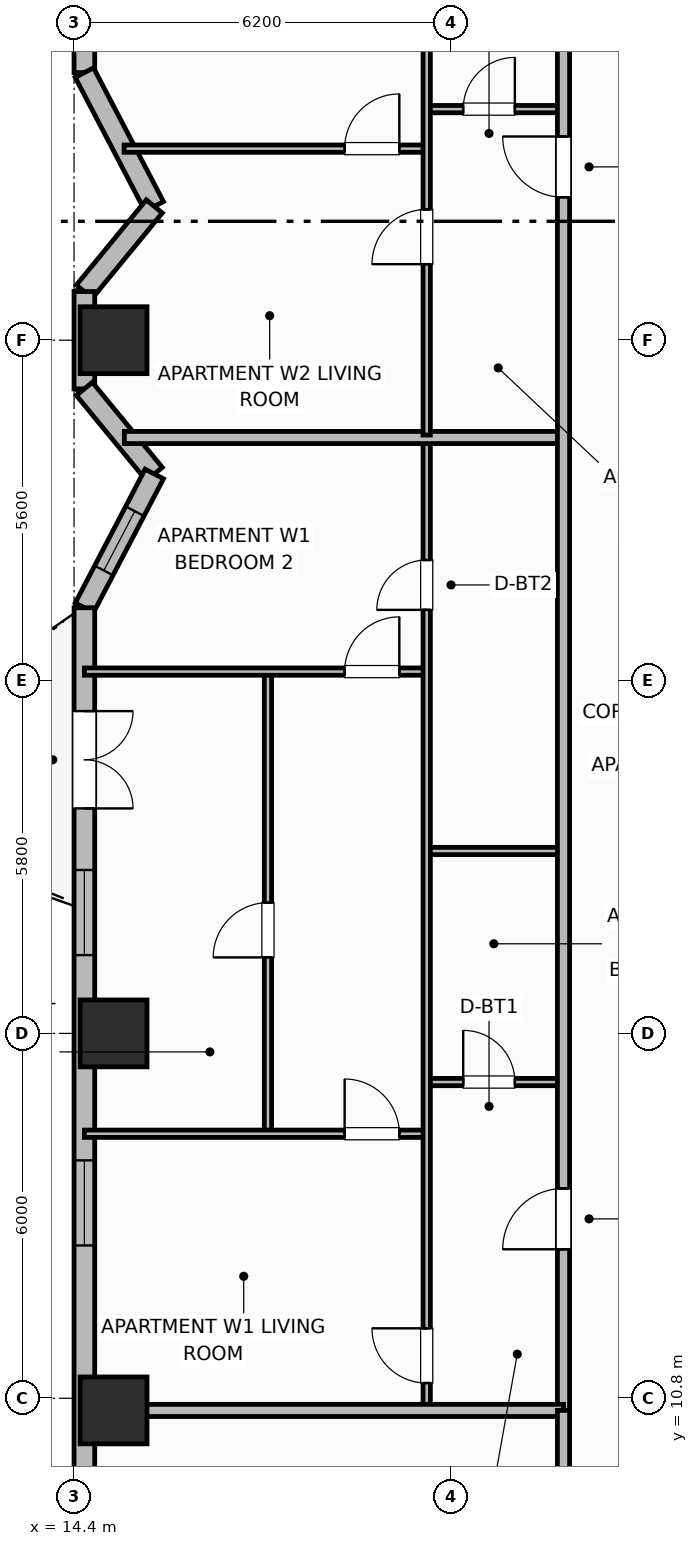
"""IFC4 building model, lengths in metres.
Left out: names, types, materials, properties, quantities, classifications, styles, units other than length and angle.
Written with IfcOpenShell. Run it as: python <this file> out.ifc"""

import sys

from ifc_helpers import new_model, si_unit, direction, frame, frame_2d, origin, origin_2d, place, context, subcontext, project, spatial, rectangle, extrude, element, fill, save


model = new_model("IFC4")
c1 = context("Model", 3, precision=1e-05, world=origin(), true_north=direction((0.0, 1.0)))
c2 = subcontext(c1, "Body", "Model", "MODEL_VIEW")
j1 = project(units=[si_unit("LENGTHUNIT", "METRE"), si_unit("PLANEANGLEUNIT", "RADIAN")], contexts=[c1])
p1 = place(None, origin())
s1 = spatial("IfcSite", under=j1, at=p1, CompositionType="ELEMENT")
p2 = place(p1, origin())
s2 = spatial("IfcBuilding", under=s1, at=p2, CompositionType="ELEMENT")
p3 = place(p2, frame((0.0, 0.0, 129.0)))
s3 = spatial("IfcBuildingStorey", under=s2, at=p3, CompositionType="ELEMENT", Elevation=129.0)
for number, where, z_axis, x_axis in (
    (1, (15.05, 10.6, 0.0), (0.0, 0.0, 1.0), (1.0, 0.0, 0.0)),
    (2, (15.05, 16.8, 0.0), (0.0, 0.0, 1.0), (1.0, 0.0, 0.0)),
    (3, (15.05, 28.2, 0.0), (0.0, 0.0, 1.0), (1.0, 0.0, 0.0)),
):
    element("IfcColumn", number, at=place(p3, frame(where, z_axis=z_axis, x_axis=x_axis)), inside=s3, PredefinedType="COLUMN", context=c2, shape_type="SweptSolid", body=[
        extrude(rectangle(XDim=1.1, YDim=1.1, at=origin_2d()), origin(), (0.0, 0.0, 1.0), 3.7),
    ])
p4 = place(p3, frame((14.57, 47.4, 0.0), z_axis=(0.0, 0.0, 1.0), x_axis=(0.0, -1.0, 0.0)))
e4 = element("IfcWall", 4, at=p4, inside=s3, PredefinedType="SOLIDWALL", context=c2, shape_type="SweptSolid", body=[
    extrude(rectangle(XDim=14.8, YDim=0.34, at=frame_2d((7.4, 0.0))), origin(), (0.0, 0.0, 1.0), 2.7),
])
p5 = place(p4, frame((4.212, 0.0, 0.68)))
e5 = element("IfcOpeningElement", 5, at=p5, cuts=e4, PredefinedType="OPENING", context=c2, shape_type="SweptSolid", body=[
    extrude(rectangle(XDim=1.6, YDim=1.9, at=frame_2d((0.8, 0.95))), frame((0.0, 0.18, 0.0), z_axis=(0.0, -1.0, 0.0), x_axis=(1.0, 0.0, 0.0)), (0.0, 0.0, 1.0), 0.36),
])
p6 = place(p4, frame((8.4, 0.0, 0.69)))
e6 = element("IfcOpeningElement", 6, at=p6, cuts=e4, PredefinedType="OPENING", context=c2, shape_type="SweptSolid", body=[
    extrude(rectangle(XDim=1.4, YDim=1.85, at=frame_2d((0.7, 0.925))), frame((0.0, 0.18, 0.0), z_axis=(0.0, -1.0, 0.0), x_axis=(1.0, 0.0, 0.0)), (0.0, 0.0, 1.0), 0.36),
])
p7 = place(p4, frame((11.663, 0.0, 0.68)))
e7 = element("IfcOpeningElement", 7, at=p7, cuts=e4, PredefinedType="OPENING", context=c2, shape_type="SweptSolid", body=[
    extrude(rectangle(XDim=1.6, YDim=1.9, at=frame_2d((0.8, 0.95))), frame((0.0, 0.18, 0.0), z_axis=(0.0, -1.0, 0.0), x_axis=(1.0, 0.0, 0.0)), (0.0, 0.0, 1.0), 0.36),
])
p8 = place(p3, frame((14.57, 32.6, 0.0), z_axis=(0.0, 0.0, 1.0), x_axis=(0.463191013929, -0.88625847506, 0.0)))
e8 = element("IfcWall", 8, at=p8, inside=s3, PredefinedType="SOLIDWALL", context=c2, shape_type="SweptSolid", body=[
    extrude(rectangle(XDim=2.483, YDim=0.34, at=frame_2d((1.241, 0.0))), origin(), (0.0, 0.0, 1.0), 2.7),
])
p9 = place(p3, frame((15.72, 30.4, 0.0), z_axis=(0.0, 0.0, 1.0), x_axis=(-0.634733675645, -0.772730975827, 0.0)))
e9 = element("IfcWall", 9, at=p9, inside=s3, PredefinedType="SOLIDWALL", context=c2, shape_type="SweptSolid", body=[
    extrude(rectangle(XDim=1.812, YDim=0.34, at=frame_2d((0.906, 0.0))), origin(), (0.0, 0.0, 1.0), 2.7),
])
p10 = place(p3, frame((14.57, 29.0, 0.0), z_axis=(0.0, 0.0, 1.0), x_axis=(0.0, -1.0, 0.0)))
e10 = element("IfcWall", 10, at=p10, inside=s3, PredefinedType="SOLIDWALL", context=c2, shape_type="SweptSolid", body=[
    extrude(rectangle(XDim=1.6, YDim=0.34, at=frame_2d((0.8, 0.0))), origin(), (0.0, 0.0, 1.0), 2.7),
])
p11 = place(p3, frame((14.57, 27.4, 0.0), z_axis=(0.0, 0.0, 1.0), x_axis=(0.634733675645, -0.772730975827, 0.0)))
e11 = element("IfcWall", 11, at=p11, inside=s3, PredefinedType="SOLIDWALL", context=c2, shape_type="SweptSolid", body=[
    extrude(rectangle(XDim=1.812, YDim=0.34, at=frame_2d((0.906, 0.0))), origin(), (0.0, 0.0, 1.0), 2.7),
])
p12 = place(p3, frame((15.72, 26.0, 0.0), z_axis=(0.0, 0.0, 1.0), x_axis=(-0.46323138706, -0.886237373418, 0.0)))
e12 = element("IfcWall", 12, at=p12, inside=s3, PredefinedType="SOLIDWALL", context=c2, shape_type="SweptSolid", body=[
    extrude(rectangle(XDim=2.482, YDim=0.34, at=frame_2d((1.241, 0.0))), origin(), (0.0, 0.0, 1.0), 2.7),
])
p13 = place(p12, frame((0.691, 0.0, 0.89)))
e13 = element("IfcOpeningElement", 13, at=p13, cuts=e12, PredefinedType="OPENING", context=c2, shape_type="SweptSolid", body=[
    extrude(rectangle(XDim=1.1, YDim=1.65, at=frame_2d((0.55, 0.825))), frame((0.0, 0.18, 0.0), z_axis=(0.0, -1.0, 0.0), x_axis=(1.0, 0.0, 0.0)), (0.0, 0.0, 1.0), 0.36),
])
p14 = place(p3, frame((14.57, 23.8, 0.0), z_axis=(0.0, 0.0, 1.0), x_axis=(0.0, -1.0, 0.0)))
e14 = element("IfcWall", 14, at=p14, inside=s3, PredefinedType="SOLIDWALL", context=c2, shape_type="SweptSolid", body=[
    extrude(rectangle(XDim=14.8, YDim=0.34, at=frame_2d((7.4, 0.0))), origin(), (0.0, 0.0, 1.0), 2.7),
])
p15 = place(p14, frame((1.7, 0.0, 0.0)))
e15 = element("IfcOpeningElement", 15, at=p15, cuts=e14, PredefinedType="OPENING", context=c2, shape_type="SweptSolid", body=[
    extrude(rectangle(XDim=1.6, YDim=2.1, at=frame_2d((0.8, 1.05))), frame((0.0, 0.18, 0.0), z_axis=(0.0, -1.0, 0.0), x_axis=(1.0, 0.0, 0.0)), (0.0, 0.0, 1.0), 0.36),
])
p16 = place(p14, frame((4.312, 0.0, 0.73)))
e16 = element("IfcOpeningElement", 16, at=p16, cuts=e14, PredefinedType="OPENING", context=c2, shape_type="SweptSolid", body=[
    extrude(rectangle(XDim=1.4, YDim=1.85, at=frame_2d((0.7, 0.925))), frame((0.0, 0.18, 0.0), z_axis=(0.0, -1.0, 0.0), x_axis=(1.0, 0.0, 0.0)), (0.0, 0.0, 1.0), 0.36),
])
p17 = place(p14, frame((9.087, 0.0, 0.73)))
e17 = element("IfcOpeningElement", 17, at=p17, cuts=e14, PredefinedType="OPENING", context=c2, shape_type="SweptSolid", body=[
    extrude(rectangle(XDim=1.4, YDim=1.85, at=frame_2d((0.7, 0.925))), frame((0.0, 0.18, 0.0), z_axis=(0.0, -1.0, 0.0), x_axis=(1.0, 0.0, 0.0)), (0.0, 0.0, 1.0), 0.36),
])
p18 = place(p3, frame((20.2, 16.0, 0.0), z_axis=(0.0, 0.0, 1.0), x_axis=(1.0, 0.0, 0.0)))
e18 = element("IfcWall", 18, at=p18, inside=s3, PredefinedType="PARTITIONING", context=c2, shape_type="SweptSolid", body=[
    extrude(rectangle(XDim=2.25, YDim=0.12, at=frame_2d((1.125, 0.0))), origin(), (0.0, 0.0, 1.0), 2.53),
])
p19 = place(p18, frame((0.6, 0.0, 0.0)))
e19 = element("IfcOpeningElement", 19, at=p19, cuts=e18, PredefinedType="OPENING", context=c2, shape_type="SweptSolid", body=[
    extrude(rectangle(XDim=0.85, YDim=2.1, at=frame_2d((0.425, 1.05))), frame((0.0, 0.07, 0.0), z_axis=(0.0, -1.0, 0.0), x_axis=(1.0, 0.0, 0.0)), (0.0, 0.0, 1.0), 0.14),
])
p20 = place(p3, frame((20.2, 19.8, 0.0), z_axis=(0.0, 0.0, 1.0), x_axis=(1.0, 0.0, 0.0)))
e20 = element("IfcWall", 20, at=p20, inside=s3, PredefinedType="PARTITIONING", context=c2, shape_type="SweptSolid", body=[
    extrude(rectangle(XDim=2.25, YDim=0.12, at=frame_2d((1.125, 0.0))), origin(), (0.0, 0.0, 1.0), 2.53),
])
p21 = place(p3, frame((17.589, 15.19, 0.0), z_axis=(0.0, 0.0, 1.0), x_axis=(0.0, 1.0, 0.0)))
e21 = element("IfcWall", 21, at=p21, inside=s3, PredefinedType="PARTITIONING", context=c2, shape_type="SweptSolid", body=[
    extrude(rectangle(XDim=7.52, YDim=0.12, at=frame_2d((3.76, 0.0))), origin(), (0.0, 0.0, 1.0), 2.53),
])
p22 = place(p21, frame((2.86, 0.0, 0.0)))
e22 = element("IfcOpeningElement", 22, at=p22, cuts=e21, PredefinedType="OPENING", context=c2, shape_type="SweptSolid", body=[
    extrude(rectangle(XDim=0.9, YDim=2.1, at=frame_2d((0.45, 1.05))), frame((0.0, 0.07, 0.0), z_axis=(0.0, -1.0, 0.0), x_axis=(1.0, 0.0, 0.0)), (0.0, 0.0, 1.0), 0.14),
])
p23 = place(p3, frame((14.57, 15.15, 0.0), z_axis=(0.0, 0.0, 1.0), x_axis=(1.0, 0.0, 0.0)))
e23 = element("IfcWall", 23, at=p23, inside=s3, PredefinedType="PARTITIONING", context=c2, shape_type="SweptSolid", body=[
    extrude(rectangle(XDim=5.63, YDim=0.12, at=frame_2d((2.815, 0.0))), origin(), (0.0, 0.0, 1.0), 2.53),
])
p24 = place(p23, frame((4.28, 0.0, 0.0)))
e24 = element("IfcOpeningElement", 24, at=p24, cuts=e23, PredefinedType="OPENING", context=c2, shape_type="SweptSolid", body=[
    extrude(rectangle(XDim=0.9, YDim=2.1, at=frame_2d((0.45, 1.05))), frame((0.0, 0.07, 0.0), z_axis=(0.0, -1.0, 0.0), x_axis=(1.0, 0.0, 0.0)), (0.0, 0.0, 1.0), 0.14),
])
p25 = place(p3, frame((14.57, 22.75, 0.0), z_axis=(0.0, 0.0, 1.0), x_axis=(1.0, 0.0, 0.0)))
e25 = element("IfcWall", 25, at=p25, inside=s3, PredefinedType="PARTITIONING", context=c2, shape_type="SweptSolid", body=[
    extrude(rectangle(XDim=5.63, YDim=0.12, at=frame_2d((2.815, 0.0))), origin(), (0.0, 0.0, 1.0), 2.53),
])
p26 = place(p25, frame((4.28, 0.0, 0.0)))
e26 = element("IfcOpeningElement", 26, at=p26, cuts=e25, PredefinedType="OPENING", context=c2, shape_type="SweptSolid", body=[
    extrude(rectangle(XDim=0.9, YDim=2.1, at=frame_2d((0.45, 1.05))), frame((0.0, 0.07, 0.0), z_axis=(0.0, -1.0, 0.0), x_axis=(1.0, 0.0, 0.0)), (0.0, 0.0, 1.0), 0.14),
])
p27 = place(p3, frame((20.2, 10.64, 0.0), z_axis=(0.0, 0.0, 1.0), x_axis=(0.0, 1.0, 0.0)))
e27 = element("IfcWall", 27, at=p27, inside=s3, PredefinedType="PARTITIONING", context=c2, shape_type="SweptSolid", body=[
    extrude(rectangle(XDim=15.92, YDim=0.12, at=frame_2d((7.96, 0.0))), origin(), (0.0, 0.0, 1.0), 2.53),
])
p28 = place(p27, frame((0.41, 0.0, 0.0)))
e28 = element("IfcOpeningElement", 28, at=p28, cuts=e27, PredefinedType="OPENING", context=c2, shape_type="SweptSolid", body=[
    extrude(rectangle(XDim=0.9, YDim=2.1, at=frame_2d((0.45, 1.05))), frame((0.0, 0.07, 0.0), z_axis=(0.0, -1.0, 0.0), x_axis=(1.0, 0.0, 0.0)), (0.0, 0.0, 1.0), 0.14),
])
p29 = place(p27, frame((13.125, 0.0, 0.0)))
e29 = element("IfcOpeningElement", 29, at=p29, cuts=e27, PredefinedType="OPENING", context=c2, shape_type="SweptSolid", body=[
    extrude(rectangle(XDim=0.82, YDim=2.08, at=frame_2d((0.41, 1.04))), frame((0.0, 0.07, 0.0), z_axis=(0.0, -1.0, 0.0), x_axis=(1.0, 0.0, 0.0)), (0.0, 0.0, 1.0), 0.14),
])
p30 = place(p3, frame((15.227, 26.6, 0.0), z_axis=(0.0, 0.0, 1.0), x_axis=(1.0, 0.0, 0.0)))
e30 = element("IfcWall", 30, at=p30, inside=s3, PredefinedType="PARTITIONING", context=c2, shape_type="SweptSolid", body=[
    extrude(rectangle(XDim=7.223, YDim=0.2, at=frame_2d((3.611, 0.0))), origin(), (0.0, 0.0, 1.0), 2.53),
])
p31 = place(p3, frame((20.2, 32.0, 0.0), z_axis=(0.0, 0.0, 1.0), x_axis=(1.0, 0.0, 0.0)))
e31 = element("IfcWall", 31, at=p31, inside=s3, PredefinedType="PARTITIONING", context=c2, shape_type="SweptSolid", body=[
    extrude(rectangle(XDim=2.25, YDim=0.12, at=frame_2d((1.125, 0.0))), origin(), (0.0, 0.0, 1.0), 2.53),
])
p32 = place(p31, frame((0.6, 0.0, 0.0)))
e32 = element("IfcOpeningElement", 32, at=p32, cuts=e31, PredefinedType="OPENING", context=c2, shape_type="SweptSolid", body=[
    extrude(rectangle(XDim=0.85, YDim=2.1, at=frame_2d((0.425, 1.05))), frame((0.0, 0.07, 0.0), z_axis=(0.0, -1.0, 0.0), x_axis=(1.0, 0.0, 0.0)), (0.0, 0.0, 1.0), 0.14),
])
p33 = place(p3, frame((15.223, 31.35, 0.0), z_axis=(0.0, 0.0, 1.0), x_axis=(1.0, 0.0, 0.0)))
e33 = element("IfcWall", 33, at=p33, inside=s3, PredefinedType="PARTITIONING", context=c2, shape_type="SweptSolid", body=[
    extrude(rectangle(XDim=4.977, YDim=0.12, at=frame_2d((2.488, 0.0))), origin(), (0.0, 0.0, 1.0), 2.53),
])
p34 = place(p33, frame((3.627, 0.0, 0.0)))
e34 = element("IfcOpeningElement", 34, at=p34, cuts=e33, PredefinedType="OPENING", context=c2, shape_type="SweptSolid", body=[
    extrude(rectangle(XDim=0.9, YDim=2.1, at=frame_2d((0.45, 1.05))), frame((0.0, 0.07, 0.0), z_axis=(0.0, -1.0, 0.0), x_axis=(1.0, 0.0, 0.0)), (0.0, 0.0, 1.0), 0.14),
])
p35 = place(p3, frame((20.2, 26.64, 0.0), z_axis=(0.0, 0.0, 1.0), x_axis=(0.0, 1.0, 0.0)))
e35 = element("IfcWall", 35, at=p35, inside=s3, PredefinedType="PARTITIONING", context=c2, shape_type="SweptSolid", body=[
    extrude(rectangle(XDim=19.12, YDim=0.12, at=frame_2d((9.56, 0.0))), origin(), (0.0, 0.0, 1.0), 2.53),
])
p36 = place(p35, frame((2.81, 0.0, 0.0)))
e36 = element("IfcOpeningElement", 36, at=p36, cuts=e35, PredefinedType="OPENING", context=c2, shape_type="SweptSolid", body=[
    extrude(rectangle(XDim=0.9, YDim=2.1, at=frame_2d((0.45, 1.05))), frame((0.0, 0.07, 0.0), z_axis=(0.0, -1.0, 0.0), x_axis=(1.0, 0.0, 0.0)), (0.0, 0.0, 1.0), 0.14),
])
p37 = place(p35, frame((16.18, 0.0, 0.0)))
e37 = element("IfcOpeningElement", 37, at=p37, cuts=e35, PredefinedType="OPENING", context=c2, shape_type="SweptSolid", body=[
    extrude(rectangle(XDim=0.82, YDim=2.08, at=frame_2d((0.41, 1.04))), frame((0.0, 0.07, 0.0), z_axis=(0.0, -1.0, 0.0), x_axis=(1.0, 0.0, 0.0)), (0.0, 0.0, 1.0), 0.14),
])
p38 = place(p3, frame((22.45, 10.6, 0.0), z_axis=(0.0, 0.0, 1.0), x_axis=(0.0, 1.0, 0.0)))
e38 = element("IfcWall", 38, at=p38, inside=s3, PredefinedType="PARTITIONING", context=c2, shape_type="SweptSolid", body=[
    extrude(rectangle(XDim=35.2, YDim=0.2, at=frame_2d((17.6, 0.0))), origin(), (0.0, 0.0, 1.0), 2.53),
])
p39 = place(p38, frame((2.65, 0.0, 0.0)))
e39 = element("IfcOpeningElement", 39, at=p39, cuts=e38, PredefinedType="OPENING", context=c2, shape_type="SweptSolid", body=[
    extrude(rectangle(XDim=1.0, YDim=2.15, at=frame_2d((0.5, 1.075))), frame((0.0, 0.11, 0.0), z_axis=(0.0, -1.0, 0.0), x_axis=(1.0, 0.0, 0.0)), (0.0, 0.0, 1.0), 0.22),
])
p40 = place(p38, frame((19.95, 0.0, 0.0)))
e40 = element("IfcOpeningElement", 40, at=p40, cuts=e38, PredefinedType="OPENING", context=c2, shape_type="SweptSolid", body=[
    extrude(rectangle(XDim=1.0, YDim=2.15, at=frame_2d((0.5, 1.075))), frame((0.0, 0.11, 0.0), z_axis=(0.0, -1.0, 0.0), x_axis=(1.0, 0.0, 0.0)), (0.0, 0.0, 1.0), 0.22),
])
p41 = place(p3, frame((14.99, 10.6, 0.0), z_axis=(0.0, 0.0, 1.0), x_axis=(1.0, 0.0, 0.0)))
e41 = element("IfcWall", 41, at=p41, inside=s3, PredefinedType="PARTITIONING", context=c2, shape_type="SweptSolid", body=[
    extrude(rectangle(XDim=7.46, YDim=0.2, at=frame_2d((3.73, 0.0))), origin(), (0.0, 0.0, 1.0), 2.53),
])
p42 = place(p3, frame((22.45, 4.97, 0.0), z_axis=(0.0, 0.0, 1.0), x_axis=(0.0, 1.0, 0.0)))
e42 = element("IfcWall", 42, at=p42, inside=s3, PredefinedType="PARTITIONING", context=c2, shape_type="SweptSolid", body=[
    extrude(rectangle(XDim=5.63, YDim=0.2, at=frame_2d((2.815, 0.0))), origin(), (0.0, 0.0, 1.0), 2.53),
])
p43 = place(p13, origin())
e43 = element("IfcWindow", 43, at=p43, inside=s3, PartitioningType="SINGLE_PANEL", PredefinedType="WINDOW", context=c2, shape_type="SweptSolid", body=[
    extrude(rectangle(XDim=1.1, YDim=1.65, at=frame_2d((0.55, 0.825))), frame((0.0, 0.03, 0.0), z_axis=(0.0, -1.0, 0.0), x_axis=(1.0, 0.0, 0.0)), (0.0, 0.0, 1.0), 0.06),
])
fill(e13, e43)
p44 = place(p15, origin())
e44 = element("IfcDoor", 44, at=p44, inside=s3, OperationType="DOUBLE_DOOR_SINGLE_SWING", PredefinedType="DOOR", context=c2, shape_type="SweptSolid", body=[
    extrude(rectangle(XDim=1.6, YDim=2.1, at=frame_2d((0.8, 1.05))), frame((0.0, 0.025, 0.0), z_axis=(0.0, -1.0, 0.0), x_axis=(1.0, 0.0, 0.0)), (0.0, 0.0, 1.0), 0.05),
])
fill(e15, e44)
p45 = place(p16, origin())
e45 = element("IfcWindow", 45, at=p45, inside=s3, PartitioningType="SINGLE_PANEL", PredefinedType="WINDOW", context=c2, shape_type="SweptSolid", body=[
    extrude(rectangle(XDim=1.4, YDim=1.85, at=frame_2d((0.7, 0.925))), frame((0.0, 0.03, 0.0), z_axis=(0.0, -1.0, 0.0), x_axis=(1.0, 0.0, 0.0)), (0.0, 0.0, 1.0), 0.06),
])
fill(e16, e45)
p46 = place(p17, origin())
e46 = element("IfcWindow", 46, at=p46, inside=s3, PartitioningType="SINGLE_PANEL", PredefinedType="WINDOW", context=c2, shape_type="SweptSolid", body=[
    extrude(rectangle(XDim=1.4, YDim=1.85, at=frame_2d((0.7, 0.925))), frame((0.0, 0.03, 0.0), z_axis=(0.0, -1.0, 0.0), x_axis=(1.0, 0.0, 0.0)), (0.0, 0.0, 1.0), 0.06),
])
fill(e17, e46)
p47 = place(p19, origin())
e47 = element("IfcDoor", 47, at=p47, inside=s3, OperationType="SINGLE_SWING_LEFT", PredefinedType="DOOR", context=c2, shape_type="SweptSolid", body=[
    extrude(rectangle(XDim=0.85, YDim=2.1, at=frame_2d((0.425, 1.05))), frame((0.0, 0.025, 0.0), z_axis=(0.0, -1.0, 0.0), x_axis=(1.0, 0.0, 0.0)), (0.0, 0.0, 1.0), 0.05),
])
fill(e19, e47)
p48 = place(p22, origin())
e48 = element("IfcDoor", 48, at=p48, inside=s3, OperationType="SINGLE_SWING_LEFT", PredefinedType="DOOR", context=c2, shape_type="SweptSolid", body=[
    extrude(rectangle(XDim=0.9, YDim=2.1, at=frame_2d((0.45, 1.05))), frame((0.0, 0.025, 0.0), z_axis=(0.0, -1.0, 0.0), x_axis=(1.0, 0.0, 0.0)), (0.0, 0.0, 1.0), 0.05),
])
fill(e22, e48)
p49 = place(p24, origin())
e49 = element("IfcDoor", 49, at=p49, inside=s3, OperationType="SINGLE_SWING_LEFT", PredefinedType="DOOR", context=c2, shape_type="SweptSolid", body=[
    extrude(rectangle(XDim=0.9, YDim=2.1, at=frame_2d((0.45, 1.05))), frame((0.0, 0.025, 0.0), z_axis=(0.0, -1.0, 0.0), x_axis=(1.0, 0.0, 0.0)), (0.0, 0.0, 1.0), 0.05),
])
fill(e24, e49)
p50 = place(p26, origin())
e50 = element("IfcDoor", 50, at=p50, inside=s3, OperationType="SINGLE_SWING_RIGHT", PredefinedType="DOOR", context=c2, shape_type="SweptSolid", body=[
    extrude(rectangle(XDim=0.9, YDim=2.1, at=frame_2d((0.45, 1.05))), frame((0.0, 0.025, 0.0), z_axis=(0.0, -1.0, 0.0), x_axis=(1.0, 0.0, 0.0)), (0.0, 0.0, 1.0), 0.05),
])
fill(e26, e50)
p51 = place(p28, origin())
e51 = element("IfcDoor", 51, at=p51, inside=s3, OperationType="SINGLE_SWING_RIGHT", PredefinedType="DOOR", context=c2, shape_type="SweptSolid", body=[
    extrude(rectangle(XDim=0.9, YDim=2.1, at=frame_2d((0.45, 1.05))), frame((0.0, 0.025, 0.0), z_axis=(0.0, -1.0, 0.0), x_axis=(1.0, 0.0, 0.0)), (0.0, 0.0, 1.0), 0.05),
])
fill(e28, e51)
p52 = place(p29, origin())
e52 = element("IfcDoor", 52, at=p52, inside=s3, OperationType="SINGLE_SWING_LEFT", PredefinedType="DOOR", context=c2, shape_type="SweptSolid", body=[
    extrude(rectangle(XDim=0.82, YDim=2.08, at=frame_2d((0.41, 1.04))), frame((0.0, 0.025, 0.0), z_axis=(0.0, -1.0, 0.0), x_axis=(1.0, 0.0, 0.0)), (0.0, 0.0, 1.0), 0.05),
])
fill(e29, e52)
p53 = place(p32, origin())
e53 = element("IfcDoor", 53, at=p53, inside=s3, OperationType="SINGLE_SWING_RIGHT", PredefinedType="DOOR", context=c2, shape_type="SweptSolid", body=[
    extrude(rectangle(XDim=0.85, YDim=2.1, at=frame_2d((0.425, 1.05))), frame((0.0, 0.025, 0.0), z_axis=(0.0, -1.0, 0.0), x_axis=(1.0, 0.0, 0.0)), (0.0, 0.0, 1.0), 0.05),
])
fill(e32, e53)
p54 = place(p34, origin())
e54 = element("IfcDoor", 54, at=p54, inside=s3, OperationType="SINGLE_SWING_RIGHT", PredefinedType="DOOR", context=c2, shape_type="SweptSolid", body=[
    extrude(rectangle(XDim=0.9, YDim=2.1, at=frame_2d((0.45, 1.05))), frame((0.0, 0.025, 0.0), z_axis=(0.0, -1.0, 0.0), x_axis=(1.0, 0.0, 0.0)), (0.0, 0.0, 1.0), 0.05),
])
fill(e34, e54)
p55 = place(p36, origin())
e55 = element("IfcDoor", 55, at=p55, inside=s3, OperationType="SINGLE_SWING_LEFT", PredefinedType="DOOR", context=c2, shape_type="SweptSolid", body=[
    extrude(rectangle(XDim=0.9, YDim=2.1, at=frame_2d((0.45, 1.05))), frame((0.0, 0.025, 0.0), z_axis=(0.0, -1.0, 0.0), x_axis=(1.0, 0.0, 0.0)), (0.0, 0.0, 1.0), 0.05),
])
fill(e36, e55)
p56 = place(p39, origin())
e56 = element("IfcDoor", 56, at=p56, inside=s3, OperationType="SINGLE_SWING_LEFT", PredefinedType="DOOR", context=c2, shape_type="SweptSolid", body=[
    extrude(rectangle(XDim=1.0, YDim=2.15, at=frame_2d((0.5, 1.075))), frame((0.0, 0.025, 0.0), z_axis=(0.0, -1.0, 0.0), x_axis=(1.0, 0.0, 0.0)), (0.0, 0.0, 1.0), 0.05),
])
fill(e39, e56)
p57 = place(p40, origin())
e57 = element("IfcDoor", 57, at=p57, inside=s3, OperationType="SINGLE_SWING_RIGHT", PredefinedType="DOOR", context=c2, shape_type="SweptSolid", body=[
    extrude(rectangle(XDim=1.0, YDim=2.15, at=frame_2d((0.5, 1.075))), frame((0.0, 0.025, 0.0), z_axis=(0.0, -1.0, 0.0), x_axis=(1.0, 0.0, 0.0)), (0.0, 0.0, 1.0), 0.05),
])
fill(e40, e57)
save(model, sys.argv[1])
